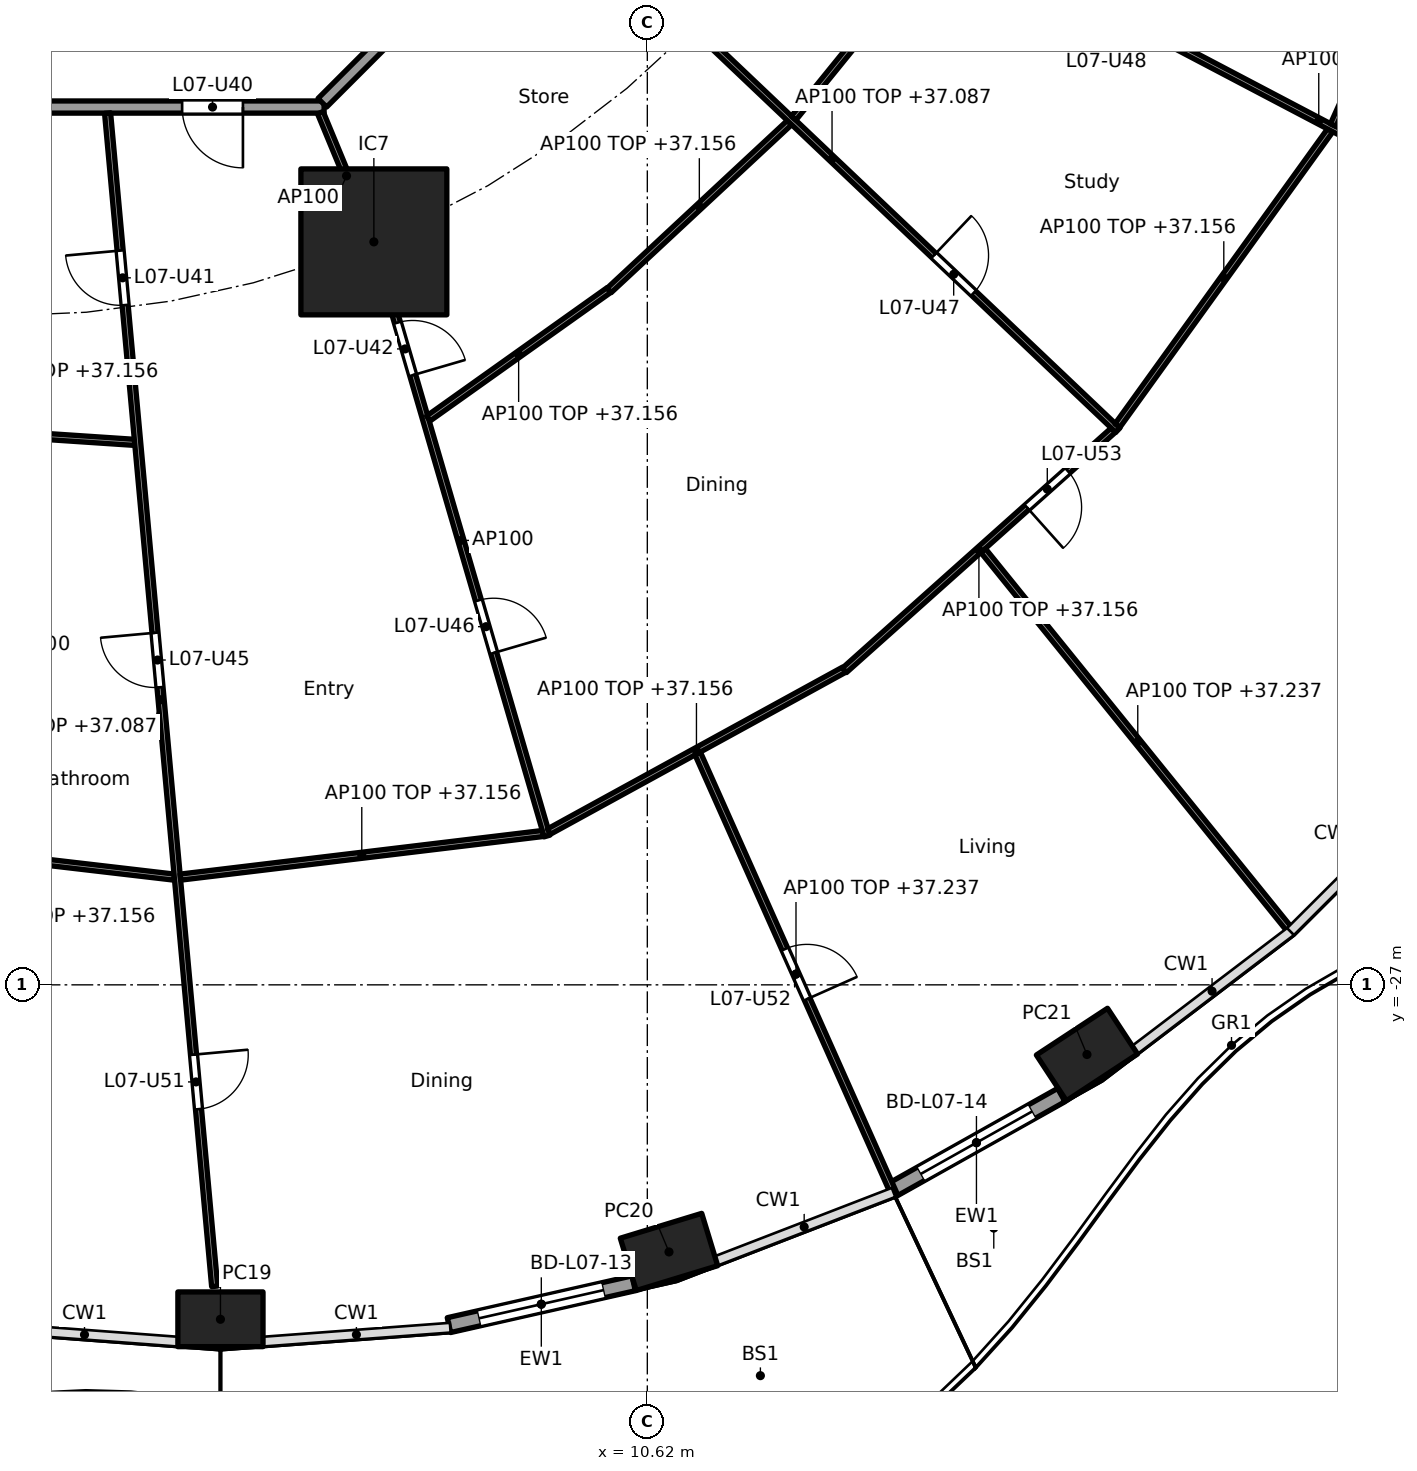
"""IFC4 building model, lengths in metres.
Left out: names, types, materials, properties, quantities, classifications, styles, units other than length and angle.
Written with IfcOpenShell. Run it as: python <this file> out.ifc"""

import sys

from ifc_helpers import new_model, si_unit, direction, frame, frame_2d, origin, origin_2d, place, context, subcontext, project, spatial, rectangle, hollow_rectangle, extrude, element, fill, save


model = new_model("IFC4")
c1 = context("Model", 3, precision=1e-05, world=origin(), true_north=direction((0.0, 1.0)))
c2 = subcontext(c1, "Body", "Model", "MODEL_VIEW")
j1 = project(units=[si_unit("LENGTHUNIT", "METRE"), si_unit("PLANEANGLEUNIT", "RADIAN")], contexts=[c1])
p1 = place(None, origin())
s1 = spatial("IfcSite", under=j1, at=p1, CompositionType="ELEMENT")
p2 = place(p1, origin())
s2 = spatial("IfcBuilding", under=s1, at=p2, CompositionType="ELEMENT")
p3 = place(p2, frame((0.0, 0.0, 34.4)))
s3 = spatial("IfcBuildingStorey", under=s2, at=p3, CompositionType="ELEMENT", Elevation=34.4)
for number, where, z_axis, x_axis in (
    (1, (3.6, -32.5, 0.0), (0.0, 0.0, 1.0), (1.0, 0.0, 0.0)),
    (2, (10.976, -31.393, 0.0), (0.0, 0.0, 1.0), (0.957, 0.292, 0.0)),
    (3, (17.85, -28.146, 0.0), (0.0, 0.0, 1.0), (0.836, 0.549, 0.0)),
):
    element("IfcColumn", number, at=place(p3, frame(where, z_axis=z_axis, x_axis=x_axis)), inside=s3, PredefinedType="COLUMN", context=c2, shape_type="SweptSolid", body=[
        extrude(hollow_rectangle(XDim=1.4, YDim=0.9, WallThickness=0.05, at=origin_2d()), origin(), (0.0, 0.0, 1.0), 3.7),
    ])
p4 = place(p3, frame((6.123, -14.782, 0.0), z_axis=(0.0, 0.0, 1.0), x_axis=(1.0, 0.0, 0.0)))
e4 = element("IfcColumn", 4, at=p4, inside=s3, PredefinedType="COLUMN", context=c2, shape_type="SweptSolid", body=[
    extrude(rectangle(XDim=2.4, YDim=2.4, at=origin_2d()), origin(), (0.0, 0.0, 1.0), 3.7),
])
p5 = place(p3, frame((10.396, -31.908, 0.0), z_axis=(0.0, 0.0, 1.0), x_axis=(-0.97533495413, -0.220729987208, 0.0)))
e5 = element("IfcWall", 5, at=p5, inside=s3, PredefinedType="SOLIDWALL", context=c2, shape_type="SweptSolid", body=[
    extrude(rectangle(XDim=3.115, YDim=0.25, at=frame_2d((1.557, 0.0))), origin(), (0.0, 0.0, 1.0), 3.44),
])
p6 = place(p5, frame((0.507, 0.0, 0.0)))
e6 = element("IfcOpeningElement", 6, at=p6, cuts=e5, PredefinedType="OPENING", context=c2, shape_type="SweptSolid", body=[
    extrude(rectangle(XDim=2.1, YDim=2.4, at=frame_2d((1.05, 1.2))), frame((0.0, 0.135, 0.0), z_axis=(0.0, -1.0, 0.0), x_axis=(1.0, 0.0, 0.0)), (0.0, 0.0, 1.0), 0.27),
])
p7 = place(p3, frame((17.428, -28.812, 0.0), z_axis=(0.0, 0.0, 1.0), x_axis=(-0.872102558443, -0.489323132048, 0.0)))
e7 = element("IfcWall", 7, at=p7, inside=s3, PredefinedType="SOLIDWALL", context=c2, shape_type="SweptSolid", body=[
    extrude(rectangle(XDim=3.201, YDim=0.25, at=frame_2d((1.601, 0.0))), origin(), (0.0, 0.0, 1.0), 3.44),
])
p8 = place(p7, frame((0.551, 0.0, 0.0)))
e8 = element("IfcOpeningElement", 8, at=p8, cuts=e7, PredefinedType="OPENING", context=c2, shape_type="SweptSolid", body=[
    extrude(rectangle(XDim=2.1, YDim=2.4, at=frame_2d((1.05, 1.2))), frame((0.0, 0.135, 0.0), z_axis=(0.0, -1.0, 0.0), x_axis=(1.0, 0.0, 0.0)), (0.0, 0.0, 1.0), 0.27),
])
p9 = place(p3, frame((-5.104, -12.565, 0.0), z_axis=(0.0, 0.0, 1.0), x_axis=(1.0, 0.0, 0.0)))
e9 = element("IfcWall", 9, at=p9, inside=s3, PredefinedType="PARTITIONING", context=c2, shape_type="SweptSolid", body=[
    extrude(rectangle(XDim=10.409, YDim=0.2, at=frame_2d((5.205, 0.0))), origin(), (0.0, 0.0, 1.0), 3.44),
])
p10 = place(p9, frame((8.074, 0.0, 0.0)))
e10 = element("IfcOpeningElement", 10, at=p10, cuts=e9, PredefinedType="OPENING", context=c2, shape_type="SweptSolid", body=[
    extrude(rectangle(XDim=1.0, YDim=2.1, at=frame_2d((0.5, 1.05))), frame((0.0, 0.11, 0.0), z_axis=(0.0, -1.0, 0.0), x_axis=(1.0, 0.0, 0.0)), (0.0, 0.0, 1.0), 0.22),
])
p11 = place(p3, frame((5.275, -12.494, 0.0), z_axis=(0.0, 0.0, 1.0), x_axis=(0.707106781187, 0.707106781187, 0.0)))
e11 = element("IfcWall", 11, at=p11, inside=s3, PredefinedType="PARTITIONING", context=c2, shape_type="SweptSolid", body=[
    extrude(rectangle(XDim=10.409, YDim=0.2, at=frame_2d((5.205, 0.0))), origin(), (0.0, 0.0, 1.0), 3.44),
])
p12 = place(p3, frame((-2.271, -17.782, 0.0), z_axis=(0.0, 0.0, 1.0), x_axis=(0.997791437766, -0.066424744789, 0.0)))
e12 = element("IfcWall", 12, at=p12, inside=s3, PredefinedType="PARTITIONING", context=c2, shape_type="SweptSolid", body=[
    extrude(rectangle(XDim=4.469, YDim=0.1, at=frame_2d((2.235, 0.0))), origin(), (0.0, 0.0, 1.0), 2.756),
])
p13 = place(p3, frame((-3.031, -24.543, 0.0), z_axis=(0.0, 0.0, 1.0), x_axis=(0.993255612046, -0.115945198862, 0.0)))
e13 = element("IfcWall", 13, at=p13, inside=s3, PredefinedType="PARTITIONING", context=c2, shape_type="SweptSolid", body=[
    extrude(rectangle(XDim=5.913, YDim=0.1, at=frame_2d((2.956, 0.0))), origin(), (0.0, 0.0, 1.0), 2.756),
])
p14 = place(p13, frame((1.028, 0.0, 0.0)))
e14 = element("IfcOpeningElement", 14, at=p14, cuts=e13, PredefinedType="OPENING", context=c2, shape_type="SweptSolid", body=[
    extrude(rectangle(XDim=0.9, YDim=2.1, at=frame_2d((0.45, 1.05))), frame((0.0, 0.06, 0.0), z_axis=(0.0, -1.0, 0.0), x_axis=(1.0, 0.0, 0.0)), (0.0, 0.0, 1.0), 0.12),
])
p15 = place(p3, frame((1.744, -12.664, 0.0), z_axis=(0.0, 0.0, 1.0), x_axis=(0.090893639596, -0.995860605849, 0.0)))
e15 = element("IfcWall", 15, at=p15, inside=s3, PredefinedType="PARTITIONING", context=c2, shape_type="SweptSolid", body=[
    extrude(rectangle(XDim=19.374, YDim=0.1, at=frame_2d((9.687, 0.0))), origin(), (0.0, 0.0, 1.0), 2.687),
])
p16 = place(p15, frame((2.27, 0.0, 0.0)))
e16 = element("IfcOpeningElement", 16, at=p16, cuts=e15, PredefinedType="OPENING", context=c2, shape_type="SweptSolid", body=[
    extrude(rectangle(XDim=0.9, YDim=2.1, at=frame_2d((0.45, 1.05))), frame((0.0, 0.06, 0.0), z_axis=(0.0, -1.0, 0.0), x_axis=(1.0, 0.0, 0.0)), (0.0, 0.0, 1.0), 0.12),
])
p17 = place(p15, frame((8.582, 0.0, 0.0)))
e17 = element("IfcOpeningElement", 17, at=p17, cuts=e15, PredefinedType="OPENING", context=c2, shape_type="SweptSolid", body=[
    extrude(rectangle(XDim=0.9, YDim=2.1, at=frame_2d((0.45, 1.05))), frame((0.0, 0.06, 0.0), z_axis=(0.0, -1.0, 0.0), x_axis=(1.0, 0.0, 0.0)), (0.0, 0.0, 1.0), 0.12),
])
p18 = place(p15, frame((15.548, 0.0, 0.0)))
e18 = element("IfcOpeningElement", 18, at=p18, cuts=e15, PredefinedType="OPENING", context=c2, shape_type="SweptSolid", body=[
    extrude(rectangle(XDim=0.9, YDim=2.1, at=frame_2d((0.45, 1.05))), frame((0.0, 0.06, 0.0), z_axis=(0.0, -1.0, 0.0), x_axis=(1.0, 0.0, 0.0)), (0.0, 0.0, 1.0), 0.12),
])
p19 = place(p3, frame((2.941, -25.229, 0.0), z_axis=(0.0, 0.0, 1.0), x_axis=(0.992836798252, 0.119478416615, 0.0)))
e19 = element("IfcWall", 19, at=p19, inside=s3, PredefinedType="PARTITIONING", context=c2, shape_type="SweptSolid", body=[
    extrude(rectangle(XDim=6.01, YDim=0.1, at=frame_2d((3.005, 0.0))), origin(), (0.0, 0.0, 1.0), 2.756),
])
p20 = place(p3, frame((5.243, -12.657, 0.0), z_axis=(0.0, 0.0, 1.0), x_axis=(0.382719158442, -0.923864733477, 0.0)))
e20 = element("IfcWall", 20, at=p20, inside=s3, PredefinedType="PARTITIONING", context=c2, shape_type="SweptSolid", body=[
    extrude(rectangle(XDim=2.25, YDim=0.1, at=frame_2d((1.125, 0.0))), origin(), (0.0, 0.0, 1.0), 3.44),
])
p21 = place(p3, frame((6.137, -14.83, 0.0), z_axis=(0.0, 0.0, 1.0), x_axis=(0.279843546189, -0.960045618529, 0.0)))
e21 = element("IfcWall", 21, at=p21, inside=s3, PredefinedType="PARTITIONING", context=c2, shape_type="SweptSolid", body=[
    extrude(rectangle(XDim=10.127, YDim=0.1, at=frame_2d((5.063, 0.0))), origin(), (0.0, 0.0, 1.0), 3.44),
])
p22 = place(p21, frame((1.334, 0.0, 0.0)))
e22 = element("IfcOpeningElement", 22, at=p22, cuts=e21, PredefinedType="OPENING", context=c2, shape_type="SweptSolid", body=[
    extrude(rectangle(XDim=0.9, YDim=2.1, at=frame_2d((0.45, 1.05))), frame((0.0, 0.06, 0.0), z_axis=(0.0, -1.0, 0.0), x_axis=(1.0, 0.0, 0.0)), (0.0, 0.0, 1.0), 0.12),
])
p23 = place(p21, frame((6.091, 0.0, 0.0)))
e23 = element("IfcOpeningElement", 23, at=p23, cuts=e21, PredefinedType="OPENING", context=c2, shape_type="SweptSolid", body=[
    extrude(rectangle(XDim=0.9, YDim=2.1, at=frame_2d((0.45, 1.05))), frame((0.0, 0.06, 0.0), z_axis=(0.0, -1.0, 0.0), x_axis=(1.0, 0.0, 0.0)), (0.0, 0.0, 1.0), 0.12),
])
p24 = place(p3, frame((7.019, -17.686, 0.0), z_axis=(0.0, 0.0, 1.0), x_axis=(0.81494477814, 0.57953861699, 0.0)))
e24 = element("IfcWall", 24, at=p24, inside=s3, PredefinedType="PARTITIONING", context=c2, shape_type="SweptSolid", body=[
    extrude(rectangle(XDim=3.644, YDim=0.1, at=frame_2d((1.822, 0.0))), origin(), (0.0, 0.0, 1.0), 2.756),
])
p25 = place(p3, frame((9.001, -24.48, 0.0), z_axis=(0.0, 0.0, 1.0), x_axis=(0.876794415294, 0.480865421203, 0.0)))
e25 = element("IfcWall", 25, at=p25, inside=s3, PredefinedType="PARTITIONING", context=c2, shape_type="SweptSolid", body=[
    extrude(rectangle(XDim=5.536, YDim=0.1, at=frame_2d((2.768, 0.0))), origin(), (0.0, 0.0, 1.0), 2.756),
])
p26 = place(p3, frame((11.448, -23.195, 0.0), z_axis=(0.0, 0.0, 1.0), x_axis=(0.407016520798, -0.913420796675, 0.0)))
e26 = element("IfcWall", 26, at=p26, inside=s3, PredefinedType="PARTITIONING", context=c2, shape_type="SweptSolid", body=[
    extrude(rectangle(XDim=7.944, YDim=0.1, at=frame_2d((3.972, 0.0))), origin(), (0.0, 0.0, 1.0), 2.837),
])
p27 = place(p26, frame((3.522, 0.0, 0.0)))
e27 = element("IfcOpeningElement", 27, at=p27, cuts=e26, PredefinedType="OPENING", context=c2, shape_type="SweptSolid", body=[
    extrude(rectangle(XDim=0.9, YDim=2.1, at=frame_2d((0.45, 1.05))), frame((0.0, 0.06, 0.0), z_axis=(0.0, -1.0, 0.0), x_axis=(1.0, 0.0, 0.0)), (0.0, 0.0, 1.0), 0.12),
])
p28 = place(p3, frame((9.993, -15.579, 0.0), z_axis=(0.0, 0.0, 1.0), x_axis=(0.732028724098, 0.681273768096, 0.0)))
e28 = element("IfcWall", 28, at=p28, inside=s3, PredefinedType="PARTITIONING", context=c2, shape_type="SweptSolid", body=[
    extrude(rectangle(XDim=4.05, YDim=0.1, at=frame_2d((2.025, 0.0))), origin(), (0.0, 0.0, 1.0), 2.756),
])
p29 = place(p3, frame((13.862, -21.828, 0.0), z_axis=(0.0, 0.0, 1.0), x_axis=(0.745812746724, 0.666155647596, 0.0)))
e29 = element("IfcWall", 29, at=p29, inside=s3, PredefinedType="PARTITIONING", context=c2, shape_type="SweptSolid", body=[
    extrude(rectangle(XDim=5.931, YDim=0.1, at=frame_2d((2.965, 0.0))), origin(), (0.0, 0.0, 1.0), 2.756),
])
p30 = place(p29, frame((4.023, 0.0, 0.0)))
e30 = element("IfcOpeningElement", 30, at=p30, cuts=e29, PredefinedType="OPENING", context=c2, shape_type="SweptSolid", body=[
    extrude(rectangle(XDim=0.9, YDim=2.1, at=frame_2d((0.45, 1.05))), frame((0.0, 0.06, 0.0), z_axis=(0.0, -1.0, 0.0), x_axis=(1.0, 0.0, 0.0)), (0.0, 0.0, 1.0), 0.12),
])
p31 = place(p3, frame((16.142, -19.858, 0.0), z_axis=(0.0, 0.0, 1.0), x_axis=(0.628738066508, -0.777617157555, 0.0)))
e31 = element("IfcWall", 31, at=p31, inside=s3, PredefinedType="PARTITIONING", context=c2, shape_type="SweptSolid", body=[
    extrude(rectangle(XDim=8.091, YDim=0.1, at=frame_2d((4.045, 0.0))), origin(), (0.0, 0.0, 1.0), 2.837),
])
p32 = place(p3, frame((8.957, -8.953, 0.0), z_axis=(0.0, 0.0, 1.0), x_axis=(0.725250022034, -0.688485588476, 0.0)))
e32 = element("IfcWall", 32, at=p32, inside=s3, PredefinedType="PARTITIONING", context=c2, shape_type="SweptSolid", body=[
    extrude(rectangle(XDim=12.963, YDim=0.1, at=frame_2d((6.481, 0.0))), origin(), (0.0, 0.0, 1.0), 2.687),
])
p33 = place(p32, frame((2.333, 0.0, 0.0)))
e33 = element("IfcOpeningElement", 33, at=p33, cuts=e32, PredefinedType="OPENING", context=c2, shape_type="SweptSolid", body=[
    extrude(rectangle(XDim=0.9, YDim=2.1, at=frame_2d((0.45, 1.05))), frame((0.0, 0.06, 0.0), z_axis=(0.0, -1.0, 0.0), x_axis=(1.0, 0.0, 0.0)), (0.0, 0.0, 1.0), 0.12),
])
p34 = place(p32, frame((8.79, 0.0, 0.0)))
e34 = element("IfcOpeningElement", 34, at=p34, cuts=e32, PredefinedType="OPENING", context=c2, shape_type="SweptSolid", body=[
    extrude(rectangle(XDim=0.9, YDim=2.1, at=frame_2d((0.45, 1.05))), frame((0.0, 0.06, 0.0), z_axis=(0.0, -1.0, 0.0), x_axis=(1.0, 0.0, 0.0)), (0.0, 0.0, 1.0), 0.12),
])
p35 = place(p3, frame((13.026, -12.747, 0.0), z_axis=(0.0, 0.0, 1.0), x_axis=(0.630126826288, 0.776492229705, 0.0)))
e35 = element("IfcWall", 35, at=p35, inside=s3, PredefinedType="PARTITIONING", context=c2, shape_type="SweptSolid", body=[
    extrude(rectangle(XDim=4.007, YDim=0.1, at=frame_2d((2.003, 0.0))), origin(), (0.0, 0.0, 1.0), 2.756),
])
p36 = place(p3, frame((18.351, -17.803, 0.0), z_axis=(0.0, 0.0, 1.0), x_axis=(0.584563700282, 0.811347817099, 0.0)))
e36 = element("IfcWall", 36, at=p36, inside=s3, PredefinedType="PARTITIONING", context=c2, shape_type="SweptSolid", body=[
    extrude(rectangle(XDim=5.984, YDim=0.1, at=frame_2d((2.992, 0.0))), origin(), (0.0, 0.0, 1.0), 2.756),
])
p37 = place(p3, frame((15.538, -9.574, 0.0), z_axis=(0.0, 0.0, 1.0), x_axis=(0.885181406501, -0.465246039838, 0.0)))
e37 = element("IfcWall", 37, at=p37, inside=s3, PredefinedType="PARTITIONING", context=c2, shape_type="SweptSolid", body=[
    extrude(rectangle(XDim=13.837, YDim=0.1, at=frame_2d((6.918, 0.0))), origin(), (0.0, 0.0, 1.0), 2.756),
])
p38 = place(p37, frame((3.156, 0.0, 0.0)))
e38 = element("IfcOpeningElement", 38, at=p38, cuts=e37, PredefinedType="OPENING", context=c2, shape_type="SweptSolid", body=[
    extrude(rectangle(XDim=0.9, YDim=2.1, at=frame_2d((0.45, 1.05))), frame((0.0, 0.06, 0.0), z_axis=(0.0, -1.0, 0.0), x_axis=(1.0, 0.0, 0.0)), (0.0, 0.0, 1.0), 0.12),
])
p39 = place(p37, frame((10.05, 0.0, 0.0)))
e39 = element("IfcOpeningElement", 39, at=p39, cuts=e37, PredefinedType="OPENING", context=c2, shape_type="SweptSolid", body=[
    extrude(rectangle(XDim=0.9, YDim=2.1, at=frame_2d((0.45, 1.05))), frame((0.0, 0.06, 0.0), z_axis=(0.0, -1.0, 0.0), x_axis=(1.0, 0.0, 0.0)), (0.0, 0.0, 1.0), 0.12),
])
p40 = place(p3, frame((21.899, -12.861, 0.0), z_axis=(0.0, 0.0, 1.0), x_axis=(0.410201529109, 0.911994904326, 0.0)))
e40 = element("IfcWall", 40, at=p40, inside=s3, PredefinedType="PARTITIONING", context=c2, shape_type="SweptSolid", body=[
    extrude(rectangle(XDim=5.787, YDim=0.1, at=frame_2d((2.894, 0.0))), origin(), (0.0, 0.0, 1.0), 2.756),
])
p41 = place(p6, origin())
e41 = element("IfcDoor", 41, at=p41, inside=s3, OperationType="SLIDING_TO_LEFT", PredefinedType="DOOR", context=c2, shape_type="SweptSolid", body=[
    extrude(rectangle(XDim=2.1, YDim=2.4, at=frame_2d((1.05, 1.2))), frame((0.0, 0.025, 0.0), z_axis=(0.0, -1.0, 0.0), x_axis=(1.0, 0.0, 0.0)), (0.0, 0.0, 1.0), 0.05),
])
fill(e6, e41)
p42 = place(p8, origin())
e42 = element("IfcDoor", 42, at=p42, inside=s3, OperationType="SLIDING_TO_LEFT", PredefinedType="DOOR", context=c2, shape_type="SweptSolid", body=[
    extrude(rectangle(XDim=2.1, YDim=2.4, at=frame_2d((1.05, 1.2))), frame((0.0, 0.025, 0.0), z_axis=(0.0, -1.0, 0.0), x_axis=(1.0, 0.0, 0.0)), (0.0, 0.0, 1.0), 0.05),
])
fill(e8, e42)
p43 = place(p10, frame((1.0, 0.0, 0.0), x_axis=(-1.0, 0.0, 0.0)))
e43 = element("IfcDoor", 43, at=p43, inside=s3, OperationType="SINGLE_SWING_LEFT", PredefinedType="DOOR", context=c2, shape_type="SweptSolid", body=[
    extrude(rectangle(XDim=1.0, YDim=2.1, at=frame_2d((0.5, 1.05))), frame((0.0, 0.025, 0.0), z_axis=(0.0, -1.0, 0.0), x_axis=(1.0, 0.0, 0.0)), (0.0, 0.0, 1.0), 0.05),
])
fill(e10, e43)
p44 = place(p16, frame((0.9, 0.0, 0.0), x_axis=(-1.0, 0.0, 0.0)))
e44 = element("IfcDoor", 44, at=p44, inside=s3, OperationType="SINGLE_SWING_RIGHT", PredefinedType="DOOR", context=c2, shape_type="SweptSolid", body=[
    extrude(rectangle(XDim=0.9, YDim=2.1, at=frame_2d((0.45, 1.05))), frame((0.0, 0.025, 0.0), z_axis=(0.0, -1.0, 0.0), x_axis=(1.0, 0.0, 0.0)), (0.0, 0.0, 1.0), 0.05),
])
fill(e16, e44)
p45 = place(p22, origin())
e45 = element("IfcDoor", 45, at=p45, inside=s3, OperationType="SINGLE_SWING_RIGHT", PredefinedType="DOOR", context=c2, shape_type="SweptSolid", body=[
    extrude(rectangle(XDim=0.9, YDim=2.1, at=frame_2d((0.45, 1.05))), frame((0.0, 0.025, 0.0), z_axis=(0.0, -1.0, 0.0), x_axis=(1.0, 0.0, 0.0)), (0.0, 0.0, 1.0), 0.05),
])
fill(e22, e45)
p46 = place(p17, frame((0.9, 0.0, 0.0), x_axis=(-1.0, 0.0, 0.0)))
e46 = element("IfcDoor", 46, at=p46, inside=s3, OperationType="SINGLE_SWING_RIGHT", PredefinedType="DOOR", context=c2, shape_type="SweptSolid", body=[
    extrude(rectangle(XDim=0.9, YDim=2.1, at=frame_2d((0.45, 1.05))), frame((0.0, 0.025, 0.0), z_axis=(0.0, -1.0, 0.0), x_axis=(1.0, 0.0, 0.0)), (0.0, 0.0, 1.0), 0.05),
])
fill(e17, e46)
p47 = place(p23, origin())
e47 = element("IfcDoor", 47, at=p47, inside=s3, OperationType="SINGLE_SWING_RIGHT", PredefinedType="DOOR", context=c2, shape_type="SweptSolid", body=[
    extrude(rectangle(XDim=0.9, YDim=2.1, at=frame_2d((0.45, 1.05))), frame((0.0, 0.025, 0.0), z_axis=(0.0, -1.0, 0.0), x_axis=(1.0, 0.0, 0.0)), (0.0, 0.0, 1.0), 0.05),
])
fill(e23, e47)
p48 = place(p34, origin())
e48 = element("IfcDoor", 48, at=p48, inside=s3, OperationType="SINGLE_SWING_LEFT", PredefinedType="DOOR", context=c2, shape_type="SweptSolid", body=[
    extrude(rectangle(XDim=0.9, YDim=2.1, at=frame_2d((0.45, 1.05))), frame((0.0, 0.025, 0.0), z_axis=(0.0, -1.0, 0.0), x_axis=(1.0, 0.0, 0.0)), (0.0, 0.0, 1.0), 0.05),
])
fill(e34, e48)
p49 = place(p18, origin())
e49 = element("IfcDoor", 49, at=p49, inside=s3, OperationType="SINGLE_SWING_LEFT", PredefinedType="DOOR", context=c2, shape_type="SweptSolid", body=[
    extrude(rectangle(XDim=0.9, YDim=2.1, at=frame_2d((0.45, 1.05))), frame((0.0, 0.025, 0.0), z_axis=(0.0, -1.0, 0.0), x_axis=(1.0, 0.0, 0.0)), (0.0, 0.0, 1.0), 0.05),
])
fill(e18, e49)
p50 = place(p27, origin())
e50 = element("IfcDoor", 50, at=p50, inside=s3, OperationType="SINGLE_SWING_RIGHT", PredefinedType="DOOR", context=c2, shape_type="SweptSolid", body=[
    extrude(rectangle(XDim=0.9, YDim=2.1, at=frame_2d((0.45, 1.05))), frame((0.0, 0.025, 0.0), z_axis=(0.0, -1.0, 0.0), x_axis=(1.0, 0.0, 0.0)), (0.0, 0.0, 1.0), 0.05),
])
fill(e27, e50)
p51 = place(p30, frame((0.9, 0.0, 0.0), x_axis=(-1.0, 0.0, 0.0)))
e51 = element("IfcDoor", 51, at=p51, inside=s3, OperationType="SINGLE_SWING_RIGHT", PredefinedType="DOOR", context=c2, shape_type="SweptSolid", body=[
    extrude(rectangle(XDim=0.9, YDim=2.1, at=frame_2d((0.45, 1.05))), frame((0.0, 0.025, 0.0), z_axis=(0.0, -1.0, 0.0), x_axis=(1.0, 0.0, 0.0)), (0.0, 0.0, 1.0), 0.05),
])
fill(e30, e51)
save(model, sys.argv[1])
